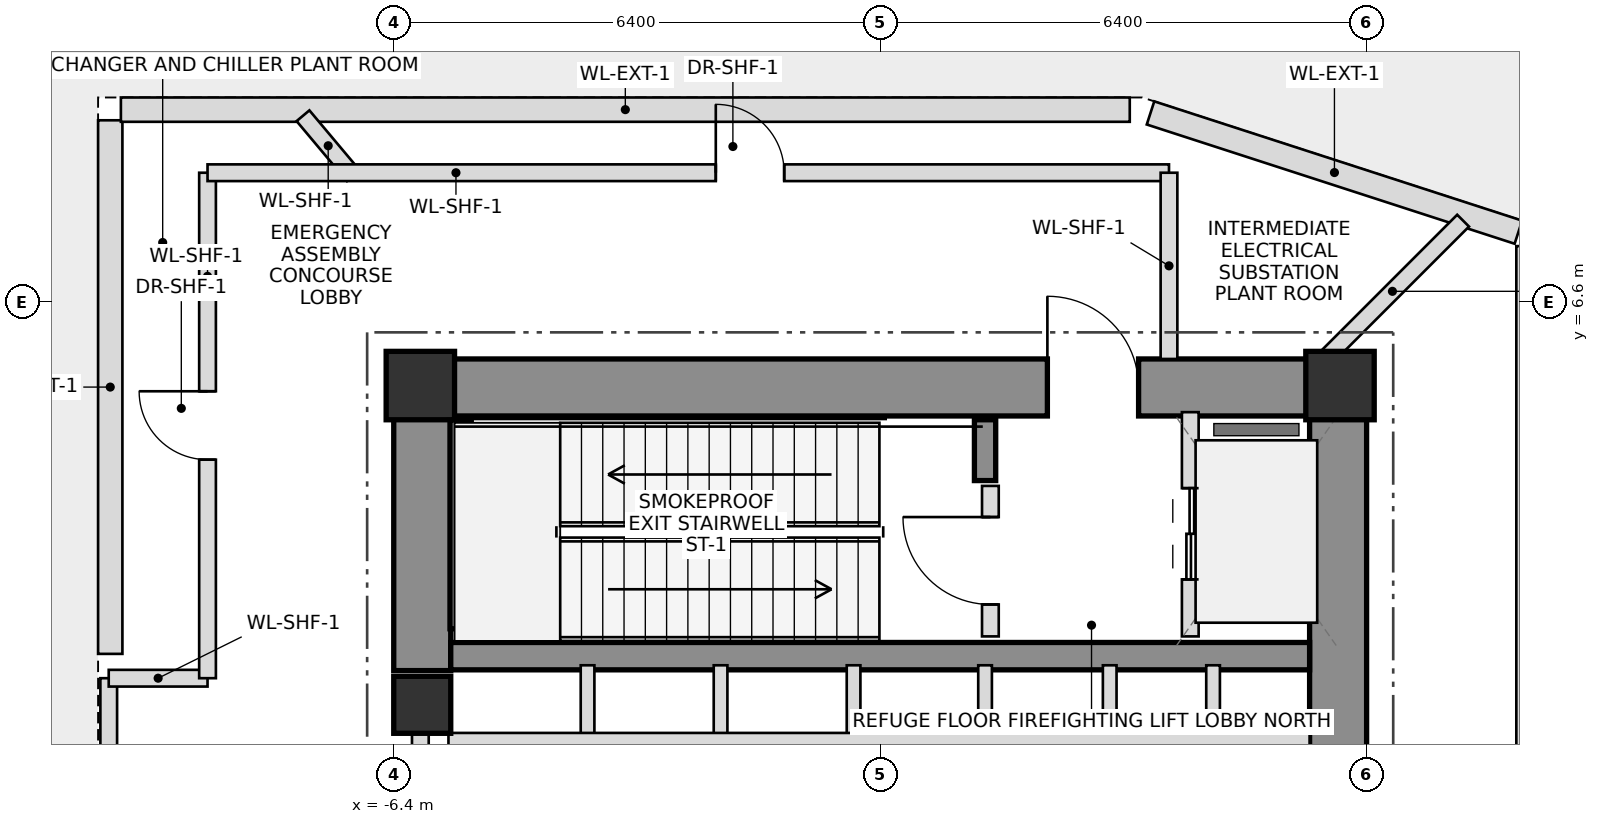
"""IFC4 building model, lengths in metres.
Left out: names, types, materials, properties, quantities, classifications, styles, units other than length and angle.
Written with IfcOpenShell. Run it as: python <this file> out.ifc"""

import sys

from ifc_helpers import new_model, si_unit, direction, frame, frame_2d, origin, origin_2d, place, context, subcontext, project, spatial, rectangle, extrude, source, transform, mapped, element, fill, save


model = new_model("IFC4")
c1 = context("Model", 3, precision=1e-05, world=origin(), true_north=direction((0.0, 1.0)))
c2 = subcontext(c1, "Body", "Model", "MODEL_VIEW")
j1 = project(units=[si_unit("LENGTHUNIT", "METRE"), si_unit("PLANEANGLEUNIT", "RADIAN")], contexts=[c1])
p1 = place(None, origin())
s1 = spatial("IfcSite", under=j1, at=p1, CompositionType="ELEMENT")
p2 = place(p1, origin())
s2 = spatial("IfcBuilding", under=s1, at=p2, CompositionType="ELEMENT")
p3 = place(p2, frame((0.0, 0.0, 84.8)))
s3 = spatial("IfcBuildingStorey", under=s2, at=p3, CompositionType="ELEMENT", Elevation=84.8)
m1 = source(origin(), c2, "Body", "SweptSolid", [
    extrude(rectangle(XDim=0.9, YDim=0.9, at=origin_2d()), origin(), (0.0, 0.0, 1.0), 5.1),
])
for number, where, z_axis, x_axis in (
    (1, (6.05, 5.5, 0.0), (0.0, 0.0, 1.0), (1.0, 0.0, 0.0)),
    (2, (-6.05, 5.5, 0.0), (0.0, 0.0, 1.0), (1.0, 0.0, 0.0)),
):
    element("IfcColumn", number, at=place(p3, frame(where, z_axis=z_axis, x_axis=x_axis)), inside=s3, PredefinedType="COLUMN", context=c2, shape_type="MappedRepresentation", body=[
        mapped(m1, transform((0.0, 0.0, 0.0), scale=1.0)),
    ])
p4 = place(p3, frame((-6.4, 5.475, 0.0), z_axis=(0.0, 0.0, 1.0), x_axis=(1.0, 0.0, 0.0)))
e3 = element("IfcWall", 3, at=p4, inside=s3, PredefinedType="SHEAR", context=c2, shape_type="SweptSolid", body=[
    extrude(rectangle(XDim=12.8, YDim=0.75, at=frame_2d((6.4, 0.0))), origin(), (0.0, 0.0, 1.0), 5.1),
])
p5 = place(p4, frame((8.6, 0.0, 0.0)))
e4 = element("IfcOpeningElement", 4, at=p5, cuts=e3, PredefinedType="OPENING", context=c2, shape_type="SweptSolid", body=[
    extrude(rectangle(XDim=1.2, YDim=2.2, at=frame_2d((0.6, 1.1))), frame((0.0, 0.385, 0.0), z_axis=(0.0, -1.0, 0.0), x_axis=(1.0, 0.0, 0.0)), (0.0, 0.0, 1.0), 0.77),
])
p6 = place(p3, frame((6.025, -5.1, 0.0), z_axis=(0.0, 0.0, 1.0), x_axis=(0.0, 1.0, 0.0)))
e5 = element("IfcWall", 5, at=p6, inside=s3, PredefinedType="SHEAR", context=c2, shape_type="SweptSolid", body=[
    extrude(rectangle(XDim=10.2, YDim=0.75, at=frame_2d((5.1, 0.0))), origin(), (0.0, 0.0, 1.0), 5.1),
])
p7 = place(p3, frame((-6.025, 1.75, 0.0), z_axis=(0.0, 0.0, 1.0), x_axis=(0.0, 1.0, 0.0)))
e6 = element("IfcWall", 6, at=p7, inside=s3, PredefinedType="SHEAR", context=c2, shape_type="SweptSolid", body=[
    extrude(rectangle(XDim=3.35, YDim=0.75, at=frame_2d((1.675, 0.0))), origin(), (0.0, 0.0, 1.0), 5.1),
])
p8 = place(p3, frame((-5.65, 1.94, 0.0), z_axis=(0.0, 0.0, 1.0), x_axis=(1.0, 0.0, 0.0)))
e7 = element("IfcWall", 7, at=p8, inside=s3, PredefinedType="SHEAR", context=c2, shape_type="SweptSolid", body=[
    extrude(rectangle(XDim=11.3, YDim=0.36, at=frame_2d((5.65, 0.0))), origin(), (0.0, 0.0, 1.0), 5.1),
])
p9 = place(p3, frame((-5.52, 2.3, 0.0), z_axis=(0.0, 0.0, 1.0), x_axis=(0.0, 1.0, 0.0)))
e8 = element("IfcWall", 8, at=p9, inside=s3, PredefinedType="SHEAR", context=c2, shape_type="SweptSolid", body=[
    extrude(rectangle(XDim=2.75, YDim=0.28, at=frame_2d((1.375, 0.0))), origin(), (0.0, 0.0, 1.0), 5.1),
])
p10 = place(p3, frame((1.38, 4.25, 0.0), z_axis=(0.0, 0.0, 1.0), x_axis=(0.0, 1.0, 0.0)))
e9 = element("IfcWall", 9, at=p10, inside=s3, PredefinedType="SHEAR", context=c2, shape_type="SweptSolid", body=[
    extrude(rectangle(XDim=0.8, YDim=0.28, at=frame_2d((0.4, 0.0))), origin(), (0.0, 0.0, 1.0), 5.1),
])
m2 = source(origin(), c2, "Body", "SweptSolid", [
    extrude(rectangle(XDim=0.75, YDim=0.75, at=origin_2d()), origin(), (0.0, 0.0, 1.0), 5.1),
])
p11 = place(p3, frame((-6.025, 1.3, 0.0), z_axis=(0.0, 0.0, 1.0), x_axis=(1.0, 0.0, 0.0)))
e10 = element("IfcColumn", 10, at=p11, inside=s3, PredefinedType="COLUMN", context=c2, shape_type="MappedRepresentation", body=[
    mapped(m2, transform((0.0, 0.0, 0.0), scale=1.0)),
])
p12 = place(p3, frame((-6.05, -0.95, 0.0), z_axis=(0.0, 0.0, 1.0), x_axis=(0.0, 1.0, 0.0)))
e11 = element("IfcWall", 11, at=p12, inside=s3, PredefinedType="PLUMBINGWALL", context=c2, shape_type="SweptSolid", body=[
    extrude(rectangle(XDim=1.9, YDim=0.22, at=frame_2d((0.95, 0.0))), origin(), (0.0, 0.0, 1.0), 3.875),
])
p13 = place(p12, frame((0.35, 0.0, 0.0)))
e12 = element("IfcOpeningElement", 12, at=p13, cuts=e11, PredefinedType="OPENING", context=c2, shape_type="SweptSolid", body=[
    extrude(rectangle(XDim=1.2, YDim=2.2, at=frame_2d((0.6, 1.1))), frame((0.0, 0.12, 0.0), z_axis=(0.0, -1.0, 0.0), x_axis=(1.0, 0.0, 0.0)), (0.0, 0.0, 1.0), 0.24),
])
p14 = place(p3, frame((1.45, 2.2, 0.0), z_axis=(0.0, 0.0, 1.0), x_axis=(0.0, 1.0, 0.0)))
e13 = element("IfcWall", 13, at=p14, inside=s3, PredefinedType="PLUMBINGWALL", context=c2, shape_type="SweptSolid", body=[
    extrude(rectangle(XDim=1.98, YDim=0.22, at=frame_2d((0.99, 0.0))), origin(), (0.0, 0.0, 1.0), 4.895),
])
p15 = place(p14, frame((0.42, 0.0, 0.0)))
e14 = element("IfcOpeningElement", 14, at=p15, cuts=e13, PredefinedType="OPENING", context=c2, shape_type="SweptSolid", body=[
    extrude(rectangle(XDim=1.15, YDim=2.15, at=frame_2d((0.575, 1.075))), frame((0.0, 0.12, 0.0), z_axis=(0.0, -1.0, 0.0), x_axis=(1.0, 0.0, 0.0)), (0.0, 0.0, 1.0), 0.24),
])
p16 = place(p3, frame((4.08, 2.2, 0.0), z_axis=(0.0, 0.0, 1.0), x_axis=(0.0, 1.0, 0.0)))
e15 = element("IfcWall", 15, at=p16, inside=s3, PredefinedType="PLUMBINGWALL", context=c2, shape_type="SweptSolid", body=[
    extrude(rectangle(XDim=2.95, YDim=0.22, at=frame_2d((1.475, 0.0))), origin(), (0.0, 0.0, 1.0), 4.895),
])
p17 = place(p16, frame((0.75, 0.0, 0.0)))
e16 = element("IfcOpeningElement", 16, at=p17, cuts=e15, PredefinedType="OPENING", context=c2, shape_type="SweptSolid", body=[
    extrude(rectangle(XDim=1.2, YDim=2.25, at=frame_2d((0.6, 1.125))), frame((0.0, 0.12, 0.0), z_axis=(0.0, -1.0, 0.0), x_axis=(1.0, 0.0, 0.0)), (0.0, 0.0, 1.0), 0.24),
])
for number, where, z_axis, x_axis in (
    (17, (-3.85, 0.84, 0.0), (0.0, 0.0, 1.0), (0.0, 1.0, 0.0)),
    (18, (-2.1, 0.84, 0.0), (0.0, 0.0, 1.0), (0.0, 1.0, 0.0)),
    (19, (-0.35, 0.84, 0.0), (0.0, 0.0, 1.0), (0.0, 1.0, 0.0)),
    (20, (1.38, 0.84, 0.0), (0.0, 0.0, 1.0), (0.0, 1.0, 0.0)),
    (21, (3.02, 0.84, 0.0), (0.0, 0.0, 1.0), (0.0, 1.0, 0.0)),
    (22, (4.38, 0.84, 0.0), (0.0, 0.0, 1.0), (0.0, 1.0, 0.0)),
):
    element("IfcWall", number, at=place(p3, frame(where, z_axis=z_axis, x_axis=x_axis)), inside=s3, PredefinedType="PLUMBINGWALL", context=c2, shape_type="SweptSolid", body=[
        extrude(rectangle(XDim=0.98, YDim=0.18, at=frame_2d((0.49, 0.0))), origin(), (0.0, 0.0, 1.0), 4.895),
    ])
p18 = place(p3, frame((-5.68, 0.84, 0.0), z_axis=(0.0, 0.0, 1.0), x_axis=(1.0, 0.0, 0.0)))
e23 = element("IfcWall", 23, at=p18, inside=s3, PredefinedType="PLUMBINGWALL", context=c2, shape_type="SweptSolid", body=[
    extrude(rectangle(XDim=11.33, YDim=0.18, at=frame_2d((5.665, 0.0))), origin(), (0.0, 0.0, 1.0), 4.895),
])
p19 = place(p3, frame((-10.13, 1.97, 0.0), z_axis=(0.0, 0.0, 1.0), x_axis=(0.0, 1.0, 0.0)))
e24 = element("IfcWall", 24, at=p19, inside=s3, PredefinedType="SOLIDWALL", context=c2, shape_type="SweptSolid", body=[
    extrude(rectangle(XDim=7.02, YDim=0.32, at=frame_2d((3.51, 0.0))), origin(), (0.0, 0.0, 1.0), 3.55),
])
p20 = place(p3, frame((-9.99, 9.13, 0.0), z_axis=(0.0, 0.0, 1.0), x_axis=(1.0, 0.0, 0.0)))
e25 = element("IfcWall", 25, at=p20, inside=s3, PredefinedType="SOLIDWALL", context=c2, shape_type="SweptSolid", body=[
    extrude(rectangle(XDim=13.274, YDim=0.32, at=frame_2d((6.637, 0.0))), origin(), (0.0, 0.0, 1.0), 4.895),
])
p21 = place(p3, frame((3.557, 9.087, 0.0), z_axis=(0.0, 0.0, 1.0), x_axis=(0.951270761555, -0.308356835843, 0.0)))
e26 = element("IfcWall", 26, at=p21, inside=s3, PredefinedType="SOLIDWALL", context=c2, shape_type="SweptSolid", body=[
    extrude(rectangle(XDim=5.088, YDim=0.32, at=frame_2d((2.544, 0.0))), origin(), (0.0, 0.0, 1.0), 3.55),
])
p22 = place(p3, frame((8.53, 7.335, 0.0), z_axis=(0.0, 0.0, 1.0), x_axis=(0.0, -1.0, 0.0)))
e27 = element("IfcWall", 27, at=p22, inside=s3, PredefinedType="SOLIDWALL", context=c2, shape_type="SweptSolid", body=[
    extrude(rectangle(XDim=13.256, YDim=0.32, at=frame_2d((6.628, 0.0))), origin(), (0.0, 0.0, 1.0), 4.895),
])
p23 = place(p3, frame((5.81, 5.81, 0.0), z_axis=(0.0, 0.0, 1.0), x_axis=(0.707106781187, 0.707106781187, 0.0)))
e28 = element("IfcWall", 28, at=p23, inside=s3, PredefinedType="PLUMBINGWALL", context=c2, shape_type="SweptSolid", body=[
    extrude(rectangle(XDim=2.63, YDim=0.22, at=frame_2d((1.315, 0.0))), origin(), (0.0, 0.0, 1.0), 3.55),
])
p24 = place(p3, frame((-6.931, 8.26, 0.0), z_axis=(0.0, 0.0, 1.0), x_axis=(-0.642881168458, 0.765965928251, 0.0)))
e29 = element("IfcWall", 29, at=p24, inside=s3, PredefinedType="PLUMBINGWALL", context=c2, shape_type="SweptSolid", body=[
    extrude(rectangle(XDim=1.031, YDim=0.22, at=frame_2d((0.516, 0.0))), origin(), (0.0, 0.0, 1.0), 4.895),
])
p25 = place(p3, frame((-10.15, -1.65, 0.0), z_axis=(0.0, 0.0, 1.0), x_axis=(0.0, 1.0, 0.0)))
e30 = element("IfcWall", 30, at=p25, inside=s3, PredefinedType="PLUMBINGWALL", context=c2, shape_type="SweptSolid", body=[
    extrude(rectangle(XDim=3.3, YDim=0.22, at=frame_2d((1.65, 0.0))), origin(), (0.0, 0.0, 1.0), 4.895),
])
p26 = place(p25, frame((1.05, 0.0, 0.0)))
e31 = element("IfcOpeningElement", 31, at=p26, cuts=e30, PredefinedType="OPENING", context=c2, shape_type="SweptSolid", body=[
    extrude(rectangle(XDim=1.2, YDim=2.2, at=frame_2d((0.6, 1.1))), frame((0.0, 0.12, 0.0), z_axis=(0.0, -1.0, 0.0), x_axis=(1.0, 0.0, 0.0)), (0.0, 0.0, 1.0), 0.24),
])
p27 = place(p3, frame((-10.15, 1.65, 0.0), z_axis=(0.0, 0.0, 1.0), x_axis=(1.0, 0.0, 0.0)))
e32 = element("IfcWall", 32, at=p27, inside=s3, PredefinedType="PLUMBINGWALL", context=c2, shape_type="SweptSolid", body=[
    extrude(rectangle(XDim=1.3, YDim=0.22, at=frame_2d((0.65, 0.0))), origin(), (0.0, 0.0, 1.0), 4.895),
])
p28 = place(p3, frame((-8.85, 1.65, 0.0), z_axis=(0.0, 0.0, 1.0), x_axis=(0.0, 1.0, 0.0)))
e33 = element("IfcWall", 33, at=p28, inside=s3, PredefinedType="PLUMBINGWALL", context=c2, shape_type="SweptSolid", body=[
    extrude(rectangle(XDim=6.65, YDim=0.22, at=frame_2d((3.325, 0.0))), origin(), (0.0, 0.0, 1.0), 3.55),
])
p29 = place(p28, frame((2.875, 0.0, 0.0)))
e34 = element("IfcOpeningElement", 34, at=p29, cuts=e33, PredefinedType="OPENING", context=c2, shape_type="SweptSolid", body=[
    extrude(rectangle(XDim=0.9, YDim=2.05, at=frame_2d((0.45, 1.025))), frame((0.0, 0.12, 0.0), z_axis=(0.0, -1.0, 0.0), x_axis=(1.0, 0.0, 0.0)), (0.0, 0.0, 1.0), 0.24),
])
p30 = place(p3, frame((-8.85, 8.3, 0.0), z_axis=(0.0, 0.0, 1.0), x_axis=(1.0, 0.0, 0.0)))
e35 = element("IfcWall", 35, at=p30, inside=s3, PredefinedType="PLUMBINGWALL", context=c2, shape_type="SweptSolid", body=[
    extrude(rectangle(XDim=12.65, YDim=0.22, at=frame_2d((6.325, 0.0))), origin(), (0.0, 0.0, 1.0), 4.895),
])
p31 = place(p30, frame((6.687, 0.0, 0.0)))
e36 = element("IfcOpeningElement", 36, at=p31, cuts=e35, PredefinedType="OPENING", context=c2, shape_type="SweptSolid", body=[
    extrude(rectangle(XDim=0.9, YDim=2.05, at=frame_2d((0.45, 1.025))), frame((0.0, 0.12, 0.0), z_axis=(0.0, -1.0, 0.0), x_axis=(1.0, 0.0, 0.0)), (0.0, 0.0, 1.0), 0.24),
])
p32 = place(p3, frame((3.8, 8.3, 0.0), z_axis=(0.0, 0.0, 1.0), x_axis=(0.0, -1.0, 0.0)))
e37 = element("IfcWall", 37, at=p32, inside=s3, PredefinedType="PLUMBINGWALL", context=c2, shape_type="SweptSolid", body=[
    extrude(rectangle(XDim=2.45, YDim=0.22, at=frame_2d((1.225, 0.0))), origin(), (0.0, 0.0, 1.0), 4.895),
])
p33 = place(p5, origin())
e38 = element("IfcDoor", 38, at=p33, inside=s3, OperationType="SINGLE_SWING_LEFT", PredefinedType="DOOR", context=c2, shape_type="SweptSolid", body=[
    extrude(rectangle(XDim=1.2, YDim=2.2, at=frame_2d((0.6, 1.1))), frame((0.0, 0.025, 0.0), z_axis=(0.0, -1.0, 0.0), x_axis=(1.0, 0.0, 0.0)), (0.0, 0.0, 1.0), 0.05),
])
fill(e4, e38)
p34 = place(p15, origin())
e39 = element("IfcDoor", 39, at=p34, inside=s3, OperationType="SINGLE_SWING_RIGHT", PredefinedType="DOOR", context=c2, shape_type="SweptSolid", body=[
    extrude(rectangle(XDim=1.15, YDim=2.15, at=frame_2d((0.575, 1.075))), frame((0.0, 0.025, 0.0), z_axis=(0.0, -1.0, 0.0), x_axis=(1.0, 0.0, 0.0)), (0.0, 0.0, 1.0), 0.05),
])
fill(e14, e39)
p35 = place(p17, origin())
e40 = element("IfcDoor", 40, at=p35, inside=s3, OperationType="DOUBLE_DOOR_SLIDING", PredefinedType="DOOR", context=c2, shape_type="SweptSolid", body=[
    extrude(rectangle(XDim=1.2, YDim=2.25, at=frame_2d((0.6, 1.125))), frame((0.0, 0.025, 0.0), z_axis=(0.0, -1.0, 0.0), x_axis=(1.0, 0.0, 0.0)), (0.0, 0.0, 1.0), 0.05),
])
fill(e16, e40)
p36 = place(p29, origin())
e41 = element("IfcDoor", 41, at=p36, inside=s3, OperationType="SINGLE_SWING_RIGHT", PredefinedType="DOOR", context=c2, shape_type="SweptSolid", body=[
    extrude(rectangle(XDim=0.9, YDim=2.05, at=frame_2d((0.45, 1.025))), frame((0.0, 0.025, 0.0), z_axis=(0.0, -1.0, 0.0), x_axis=(1.0, 0.0, 0.0)), (0.0, 0.0, 1.0), 0.05),
])
fill(e34, e41)
p37 = place(p31, origin())
e42 = element("IfcDoor", 42, at=p37, inside=s3, OperationType="SINGLE_SWING_LEFT", PredefinedType="DOOR", context=c2, shape_type="SweptSolid", body=[
    extrude(rectangle(XDim=0.9, YDim=2.05, at=frame_2d((0.45, 1.025))), frame((0.0, 0.025, 0.0), z_axis=(0.0, -1.0, 0.0), x_axis=(1.0, 0.0, 0.0)), (0.0, 0.0, 1.0), 0.05),
])
fill(e36, e42)
save(model, sys.argv[1])
